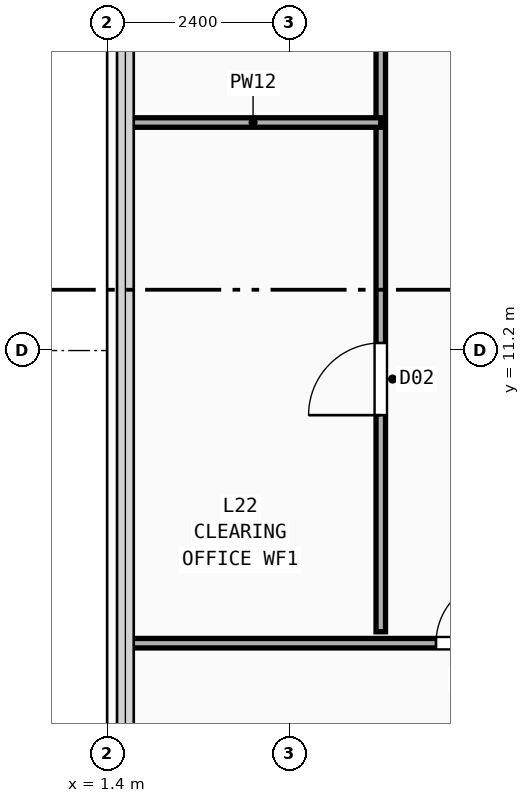
"""IFC4 building model, lengths in metres.
Left out: names, types, materials, properties, quantities, classifications, styles, units other than length and angle.
Written with IfcOpenShell. Run it as: python <this file> out.ifc"""

import sys

from ifc_helpers import new_model, si_unit, direction, frame, frame_2d, origin, place, context, subcontext, project, spatial, rectangle, extrude, element, fill, save


model = new_model("IFC4")
c1 = context("Model", 3, precision=1e-05, world=origin(), true_north=direction((0.0, 1.0)))
c2 = subcontext(c1, "Body", "Model", "MODEL_VIEW")
j1 = project(units=[si_unit("LENGTHUNIT", "METRE"), si_unit("PLANEANGLEUNIT", "RADIAN")], contexts=[c1])
p1 = place(None, origin())
s1 = spatial("IfcSite", under=j1, at=p1, CompositionType="ELEMENT")
p2 = place(p1, origin())
s2 = spatial("IfcBuilding", under=s1, at=p2, CompositionType="ELEMENT")
p3 = place(p2, frame((0.0, 0.0, 87.9)))
s3 = spatial("IfcBuildingStorey", under=s2, at=p3, CompositionType="ELEMENT", Elevation=87.9)
p4 = place(p3, frame((1.64, 7.35, 0.0), z_axis=(0.0, 0.0, 1.0), x_axis=(1.0, 0.0, 0.0)))
e1 = element("IfcWall", 1, at=p4, inside=s3, PredefinedType="PARTITIONING", context=c2, shape_type="SweptSolid", body=[
    extrude(rectangle(XDim=5.76, YDim=0.125, at=frame_2d((2.88, 0.0))), origin(), (0.0, 0.0, 1.0), 3.54),
])
p5 = place(p4, frame((4.087, 0.0, 0.0)))
e2 = element("IfcOpeningElement", 2, at=p5, cuts=e1, PredefinedType="OPENING", context=c2, shape_type="SweptSolid", body=[
    extrude(rectangle(XDim=0.85, YDim=2.15, at=frame_2d((0.425, 1.075))), frame((0.0, 0.073, 0.0), z_axis=(0.0, -1.0, 0.0), x_axis=(1.0, 0.0, 0.0)), (0.0, 0.0, 1.0), 0.145),
])
p6 = place(p3, frame((5.0, 7.5, 0.0), z_axis=(0.0, 0.0, 1.0), x_axis=(0.0, 1.0, 0.0)))
e3 = element("IfcWall", 3, at=p6, inside=s3, PredefinedType="PARTITIONING", context=c2, shape_type="SweptSolid", body=[
    extrude(rectangle(XDim=17.75, YDim=0.125, at=frame_2d((8.875, 0.0))), origin(), (0.0, 0.0, 1.0), 3.54),
])
p7 = place(p6, frame((2.85, 0.0, 0.0)))
e4 = element("IfcOpeningElement", 4, at=p7, cuts=e3, PredefinedType="OPENING", context=c2, shape_type="SweptSolid", body=[
    extrude(rectangle(XDim=0.95, YDim=2.15, at=frame_2d((0.475, 1.075))), frame((0.0, 0.073, 0.0), z_axis=(0.0, -1.0, 0.0), x_axis=(1.0, 0.0, 0.0)), (0.0, 0.0, 1.0), 0.145),
])
p8 = place(p6, frame((11.821, 0.0, 0.0)))
e5 = element("IfcOpeningElement", 5, at=p8, cuts=e3, PredefinedType="OPENING", context=c2, shape_type="SweptSolid", body=[
    extrude(rectangle(XDim=0.95, YDim=2.15, at=frame_2d((0.475, 1.075))), frame((0.0, 0.073, 0.0), z_axis=(0.0, -1.0, 0.0), x_axis=(1.0, 0.0, 0.0)), (0.0, 0.0, 1.0), 0.145),
])
p9 = place(p3, frame((1.64, 14.2, 0.0), z_axis=(0.0, 0.0, 1.0), x_axis=(1.0, 0.0, 0.0)))
e6 = element("IfcWall", 6, at=p9, inside=s3, PredefinedType="PARTITIONING", context=c2, shape_type="SweptSolid", body=[
    extrude(rectangle(XDim=3.36, YDim=0.125, at=frame_2d((1.68, 0.0))), origin(), (0.0, 0.0, 1.0), 3.54),
])
p10 = place(p5, origin())
e7 = element("IfcDoor", 7, at=p10, inside=s3, OperationType="SINGLE_SWING_RIGHT", PredefinedType="DOOR", context=c2, shape_type="SweptSolid", body=[
    extrude(rectangle(XDim=0.85, YDim=2.15, at=frame_2d((0.425, 1.075))), frame((0.0, 0.025, 0.0), z_axis=(0.0, -1.0, 0.0), x_axis=(1.0, 0.0, 0.0)), (0.0, 0.0, 1.0), 0.05),
])
fill(e2, e7)
p11 = place(p7, origin())
e8 = element("IfcDoor", 8, at=p11, inside=s3, OperationType="SINGLE_SWING_LEFT", PredefinedType="DOOR", context=c2, shape_type="SweptSolid", body=[
    extrude(rectangle(XDim=0.95, YDim=2.15, at=frame_2d((0.475, 1.075))), frame((0.0, 0.025, 0.0), z_axis=(0.0, -1.0, 0.0), x_axis=(1.0, 0.0, 0.0)), (0.0, 0.0, 1.0), 0.05),
])
fill(e4, e8)
save(model, sys.argv[1])
